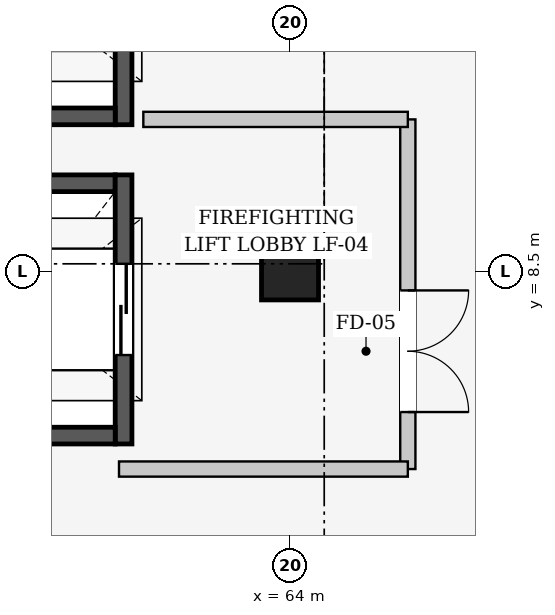
"""IFC4 building model, lengths in metres.
Left out: names, types, materials, properties, quantities, classifications, styles, units other than length and angle.
Written with IfcOpenShell. Run it as: python <this file> out.ifc"""

import sys

from ifc_helpers import new_model, si_unit, direction, frame, frame_2d, origin, origin_2d, place, context, subcontext, project, spatial, rectangle, extrude, element, fill, save


model = new_model("IFC4")
c1 = context("Model", 3, precision=1e-05, world=origin(), true_north=direction((0.0, 1.0)))
c2 = subcontext(c1, "Body", "Model", "MODEL_VIEW")
j1 = project(units=[si_unit("LENGTHUNIT", "METRE"), si_unit("PLANEANGLEUNIT", "RADIAN")], contexts=[c1])
p1 = place(None, origin())
s1 = spatial("IfcSite", under=j1, at=p1, CompositionType="ELEMENT")
p2 = place(p1, origin())
s2 = spatial("IfcBuilding", under=s1, at=p2, CompositionType="ELEMENT")
p3 = place(p2, frame((0.0, 0.0, 21.0)))
s3 = spatial("IfcBuildingStorey", under=s2, at=p3, CompositionType="ELEMENT", Elevation=21.0)
p4 = place(p3, frame((64.0, 8.5, 0.0), z_axis=(0.0, 0.0, 1.0), x_axis=(1.0, 0.0, 0.0)))
e1 = element("IfcColumn", 1, at=p4, inside=s3, PredefinedType="COLUMN", context=c2, shape_type="SweptSolid", body=[
    extrude(rectangle(XDim=0.75, YDim=0.75, at=origin_2d()), origin(), (0.0, 0.0, 1.0), 5.4),
])
p5 = place(p3, frame((59.3, 9.66, 0.0), z_axis=(0.0, 0.0, 1.0), x_axis=(1.0, 0.0, 0.0)))
e2 = element("IfcWall", 2, at=p5, inside=s3, PredefinedType="SHEAR", context=c2, shape_type="SweptSolid", body=[
    extrude(rectangle(XDim=2.4, YDim=0.22, at=frame_2d((1.2, 0.0))), origin(), (0.0, 0.0, 1.0), 5.4),
])
p6 = place(p3, frame((61.81, 9.77, 0.0), z_axis=(0.0, 0.0, 1.0), x_axis=(0.0, -1.0, 0.0)))
e3 = element("IfcWall", 3, at=p6, inside=s3, PredefinedType="SHEAR", context=c2, shape_type="SweptSolid", body=[
    extrude(rectangle(XDim=3.54, YDim=0.22, at=frame_2d((1.77, 0.0))), origin(), (0.0, 0.0, 1.0), 5.4),
])
p7 = place(p6, frame((1.17, 0.0, 0.0)))
e4 = element("IfcOpeningElement", 4, at=p7, cuts=e3, PredefinedType="OPENING", context=c2, shape_type="SweptSolid", body=[
    extrude(rectangle(XDim=1.2, YDim=2.2, at=frame_2d((0.6, 1.1))), frame((0.0, 0.12, 0.0), z_axis=(0.0, -1.0, 0.0), x_axis=(1.0, 0.0, 0.0)), (0.0, 0.0, 1.0), 0.24),
])
p8 = place(p3, frame((61.7, 6.34, 0.0), z_axis=(0.0, 0.0, 1.0), x_axis=(-1.0, 0.0, 0.0)))
e5 = element("IfcWall", 5, at=p8, inside=s3, PredefinedType="SHEAR", context=c2, shape_type="SweptSolid", body=[
    extrude(rectangle(XDim=2.4, YDim=0.22, at=frame_2d((1.2, 0.0))), origin(), (0.0, 0.0, 1.0), 5.4),
])
p9 = place(p3, frame((61.81, 13.97, 0.0), z_axis=(0.0, 0.0, 1.0), x_axis=(0.0, -1.0, 0.0)))
e6 = element("IfcWall", 6, at=p9, inside=s3, PredefinedType="SHEAR", context=c2, shape_type="SweptSolid", body=[
    extrude(rectangle(XDim=3.54, YDim=0.22, at=frame_2d((1.77, 0.0))), origin(), (0.0, 0.0, 1.0), 5.4),
])
p10 = place(p9, frame((1.22, 0.0, 0.0)))
e7 = element("IfcOpeningElement", 7, at=p10, cuts=e6, PredefinedType="OPENING", context=c2, shape_type="SweptSolid", body=[
    extrude(rectangle(XDim=1.1, YDim=2.2, at=frame_2d((0.55, 1.1))), frame((0.0, 0.12, 0.0), z_axis=(0.0, -1.0, 0.0), x_axis=(1.0, 0.0, 0.0)), (0.0, 0.0, 1.0), 0.24),
])
p11 = place(p3, frame((61.7, 10.54, 0.0), z_axis=(0.0, 0.0, 1.0), x_axis=(-1.0, 0.0, 0.0)))
e8 = element("IfcWall", 8, at=p11, inside=s3, PredefinedType="SHEAR", context=c2, shape_type="SweptSolid", body=[
    extrude(rectangle(XDim=2.4, YDim=0.22, at=frame_2d((1.2, 0.0))), origin(), (0.0, 0.0, 1.0), 5.4),
])
p12 = place(p3, frame((65.55, 10.5, 0.0), z_axis=(0.0, 0.0, 1.0), x_axis=(0.0, -1.0, 0.0)))
e9 = element("IfcWall", 9, at=p12, inside=s3, PredefinedType="PARTITIONING", context=c2, shape_type="SweptSolid", body=[
    extrude(rectangle(XDim=4.6, YDim=0.2, at=frame_2d((2.3, 0.0))), origin(), (0.0, 0.0, 1.0), 4.145),
])
p13 = place(p12, frame((2.25, 0.0, 0.0)))
e10 = element("IfcOpeningElement", 10, at=p13, cuts=e9, PredefinedType="OPENING", context=c2, shape_type="SweptSolid", body=[
    extrude(rectangle(XDim=1.6, YDim=2.2, at=frame_2d((0.8, 1.1))), frame((0.0, 0.11, 0.0), z_axis=(0.0, -1.0, 0.0), x_axis=(1.0, 0.0, 0.0)), (0.0, 0.0, 1.0), 0.22),
])
p14 = place(p3, frame((62.07, 10.5, 0.0), z_axis=(0.0, 0.0, 1.0), x_axis=(1.0, 0.0, 0.0)))
e11 = element("IfcWall", 11, at=p14, inside=s3, PredefinedType="PARTITIONING", context=c2, shape_type="SweptSolid", body=[
    extrude(rectangle(XDim=3.48, YDim=0.2, at=frame_2d((1.74, 0.0))), origin(), (0.0, 0.0, 1.0), 4.445),
])
p15 = place(p3, frame((65.55, 5.9, 0.0), z_axis=(0.0, 0.0, 1.0), x_axis=(-1.0, 0.0, 0.0)))
e12 = element("IfcWall", 12, at=p15, inside=s3, PredefinedType="PARTITIONING", context=c2, shape_type="SweptSolid", body=[
    extrude(rectangle(XDim=3.8, YDim=0.2, at=frame_2d((1.9, 0.0))), origin(), (0.0, 0.0, 1.0), 4.445),
])
p16 = place(p7, origin())
e13 = element("IfcDoor", 13, at=p16, inside=s3, OperationType="SLIDING_TO_LEFT", PredefinedType="DOOR", context=c2, shape_type="SweptSolid", body=[
    extrude(rectangle(XDim=1.2, YDim=2.2, at=frame_2d((0.6, 1.1))), frame((0.0, 0.025, 0.0), z_axis=(0.0, -1.0, 0.0), x_axis=(1.0, 0.0, 0.0)), (0.0, 0.0, 1.0), 0.05),
])
fill(e4, e13)
p17 = place(p13, origin())
e14 = element("IfcDoor", 14, at=p17, inside=s3, OperationType="DOUBLE_DOOR_SINGLE_SWING", PredefinedType="DOOR", context=c2, shape_type="SweptSolid", body=[
    extrude(rectangle(XDim=1.6, YDim=2.2, at=frame_2d((0.8, 1.1))), frame((0.0, 0.025, 0.0), z_axis=(0.0, -1.0, 0.0), x_axis=(1.0, 0.0, 0.0)), (0.0, 0.0, 1.0), 0.05),
])
fill(e10, e14)
save(model, sys.argv[1])
